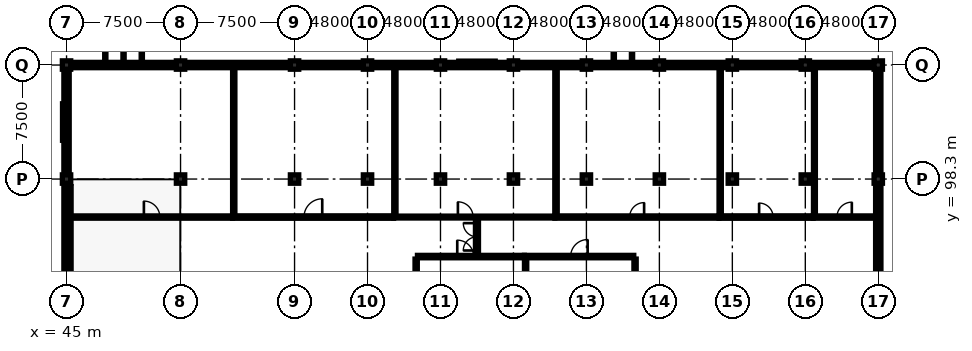
"""IFC4 building model, lengths in metres.
Left out: names, types, materials, properties, quantities, classifications, styles, units other than length and angle.
Written with IfcOpenShell. Run it as: python <this file> out.ifc"""

import sys

from ifc_helpers import new_model, si_unit, direction, frame, frame_2d, origin, origin_2d, place, context, subcontext, project, spatial, rectangle, extrude, element, fill, save


model = new_model("IFC4")
c1 = context("Model", 3, precision=1e-05, world=origin(), true_north=direction((0.0, 1.0)))
c2 = subcontext(c1, "Body", "Model", "MODEL_VIEW")
j1 = project(units=[si_unit("LENGTHUNIT", "METRE"), si_unit("PLANEANGLEUNIT", "RADIAN")], contexts=[c1])
p1 = place(None, origin())
s1 = spatial("IfcSite", under=j1, at=p1, CompositionType="ELEMENT")
p2 = place(p1, origin())
s2 = spatial("IfcBuilding", under=s1, at=p2, CompositionType="ELEMENT")
p3 = place(p2, frame((0.0, 0.0, 9.5)))
s3 = spatial("IfcBuildingStorey", under=s2, at=p3, CompositionType="ELEMENT", Elevation=9.5)
for number, where, z_axis, x_axis in (
    (1, (45.0, 98.3, 0.0), (0.0, 0.0, 1.0), (1.0, 0.0, 0.0)),
    (2, (45.0, 105.8, 0.0), (0.0, 0.0, 1.0), (1.0, 0.0, 0.0)),
):
    element("IfcColumn", number, at=place(p3, frame(where, z_axis=z_axis, x_axis=x_axis)), inside=s3, PredefinedType="COLUMN", context=c2, shape_type="SweptSolid", body=[
        extrude(rectangle(XDim=0.55, YDim=0.55, at=origin_2d()), origin(), (0.0, 0.0, 1.0), 3.75),
    ])
p4 = place(p3, frame((52.5, 98.3, 0.0), z_axis=(0.0, 0.0, 1.0), x_axis=(1.0, 0.0, 0.0)))
e3 = element("IfcColumn", 3, at=p4, inside=s3, PredefinedType="COLUMN", context=c2, shape_type="SweptSolid", body=[
    extrude(rectangle(XDim=0.55, YDim=0.55, at=origin_2d()), origin(), (0.0, 0.0, 1.0), 3.7),
])
p5 = place(p3, frame((52.5, 105.8, 0.0), z_axis=(0.0, 0.0, 1.0), x_axis=(1.0, 0.0, 0.0)))
e4 = element("IfcColumn", 4, at=p5, inside=s3, PredefinedType="COLUMN", context=c2, shape_type="SweptSolid", body=[
    extrude(rectangle(XDim=0.55, YDim=0.55, at=origin_2d()), origin(), (0.0, 0.0, 1.0), 3.75),
])
p6 = place(p3, frame((60.0, 98.3, 0.0), z_axis=(0.0, 0.0, 1.0), x_axis=(1.0, 0.0, 0.0)))
e5 = element("IfcColumn", 5, at=p6, inside=s3, PredefinedType="COLUMN", context=c2, shape_type="SweptSolid", body=[
    extrude(rectangle(XDim=0.55, YDim=0.55, at=origin_2d()), origin(), (0.0, 0.0, 1.0), 3.7),
])
p7 = place(p3, frame((60.0, 105.8, 0.0), z_axis=(0.0, 0.0, 1.0), x_axis=(1.0, 0.0, 0.0)))
e6 = element("IfcColumn", 6, at=p7, inside=s3, PredefinedType="COLUMN", context=c2, shape_type="SweptSolid", body=[
    extrude(rectangle(XDim=0.55, YDim=0.55, at=origin_2d()), origin(), (0.0, 0.0, 1.0), 3.75),
])
p8 = place(p3, frame((64.8, 98.3, 0.0), z_axis=(0.0, 0.0, 1.0), x_axis=(1.0, 0.0, 0.0)))
e7 = element("IfcColumn", 7, at=p8, inside=s3, PredefinedType="COLUMN", context=c2, shape_type="SweptSolid", body=[
    extrude(rectangle(XDim=0.55, YDim=0.55, at=origin_2d()), origin(), (0.0, 0.0, 1.0), 3.7),
])
p9 = place(p3, frame((64.8, 105.8, 0.0), z_axis=(0.0, 0.0, 1.0), x_axis=(1.0, 0.0, 0.0)))
e8 = element("IfcColumn", 8, at=p9, inside=s3, PredefinedType="COLUMN", context=c2, shape_type="SweptSolid", body=[
    extrude(rectangle(XDim=0.55, YDim=0.55, at=origin_2d()), origin(), (0.0, 0.0, 1.0), 3.75),
])
p10 = place(p3, frame((69.6, 98.3, 0.0), z_axis=(0.0, 0.0, 1.0), x_axis=(1.0, 0.0, 0.0)))
e9 = element("IfcColumn", 9, at=p10, inside=s3, PredefinedType="COLUMN", context=c2, shape_type="SweptSolid", body=[
    extrude(rectangle(XDim=0.55, YDim=0.55, at=origin_2d()), origin(), (0.0, 0.0, 1.0), 3.7),
])
p11 = place(p3, frame((69.6, 105.8, 0.0), z_axis=(0.0, 0.0, 1.0), x_axis=(1.0, 0.0, 0.0)))
e10 = element("IfcColumn", 10, at=p11, inside=s3, PredefinedType="COLUMN", context=c2, shape_type="SweptSolid", body=[
    extrude(rectangle(XDim=0.55, YDim=0.55, at=origin_2d()), origin(), (0.0, 0.0, 1.0), 3.75),
])
for number, where, z_axis, x_axis in (
    (11, (74.4, 98.3, 0.0), (0.0, 0.0, 1.0), (1.0, 0.0, 0.0)),
    (12, (74.4, 105.8, 0.0), (0.0, 0.0, 1.0), (1.0, 0.0, 0.0)),
    (13, (79.2, 98.3, 0.0), (0.0, 0.0, 1.0), (1.0, 0.0, 0.0)),
    (14, (79.2, 105.8, 0.0), (0.0, 0.0, 1.0), (1.0, 0.0, 0.0)),
    (15, (84.0, 98.3, 0.0), (0.0, 0.0, 1.0), (1.0, 0.0, 0.0)),
    (16, (84.0, 105.8, 0.0), (0.0, 0.0, 1.0), (1.0, 0.0, 0.0)),
    (17, (88.8, 98.3, 0.0), (0.0, 0.0, 1.0), (1.0, 0.0, 0.0)),
    (18, (88.8, 105.8, 0.0), (0.0, 0.0, 1.0), (1.0, 0.0, 0.0)),
    (19, (93.6, 98.3, 0.0), (0.0, 0.0, 1.0), (1.0, 0.0, 0.0)),
    (20, (93.6, 105.8, 0.0), (0.0, 0.0, 1.0), (1.0, 0.0, 0.0)),
    (21, (98.4, 98.3, 0.0), (0.0, 0.0, 1.0), (1.0, 0.0, 0.0)),
    (22, (98.4, 105.8, 0.0), (0.0, 0.0, 1.0), (1.0, 0.0, 0.0)),
):
    element("IfcColumn", number, at=place(p3, frame(where, z_axis=z_axis, x_axis=x_axis)), inside=s3, PredefinedType="COLUMN", context=c2, shape_type="SweptSolid", body=[
        extrude(rectangle(XDim=0.55, YDim=0.55, at=origin_2d()), origin(), (0.0, 0.0, 1.0), 3.7),
    ])
p12 = place(p3, frame((45.0, 91.05, 0.0), z_axis=(0.0, 0.0, 1.0), x_axis=(0.0, 1.0, 0.0)))
e23 = element("IfcWall", 23, at=p12, inside=s3, PredefinedType="SOLIDWALL", context=c2, shape_type="SweptSolid", body=[
    extrude(rectangle(XDim=6.975, YDim=0.35, at=frame_2d((3.487, 0.0))), origin(), (0.0, 0.0, 1.0), 3.035),
])
p13 = place(p3, frame((45.0, 98.575, 0.0), z_axis=(0.0, 0.0, 1.0), x_axis=(0.0, 1.0, 0.0)))
e24 = element("IfcWall", 24, at=p13, inside=s3, PredefinedType="SOLIDWALL", context=c2, shape_type="SweptSolid", body=[
    extrude(rectangle(XDim=6.95, YDim=0.35, at=frame_2d((3.475, 0.0))), origin(), (0.0, 0.0, 1.0), 3.035),
])
p14 = place(p13, frame((2.775, 0.0, 0.9)))
e25 = element("IfcOpeningElement", 25, at=p14, cuts=e24, PredefinedType="OPENING", context=c2, shape_type="SweptSolid", body=[
    extrude(rectangle(XDim=1.4, YDim=1.3, at=frame_2d((0.7, 0.65))), frame((0.0, 0.187, 0.0), z_axis=(0.0, -1.0, 0.0), x_axis=(1.0, 0.0, 0.0)), (0.0, 0.0, 1.0), 0.374),
])
p15 = place(p3, frame((45.275, 105.8, 0.0), z_axis=(0.0, 0.0, 1.0), x_axis=(1.0, 0.0, 0.0)))
e26 = element("IfcWall", 26, at=p15, inside=s3, PredefinedType="SOLIDWALL", context=c2, shape_type="SweptSolid", body=[
    extrude(rectangle(XDim=6.95, YDim=0.35, at=frame_2d((3.475, 0.0))), origin(), (0.0, 0.0, 1.0), 2.985),
])
p16 = place(p15, frame((2.775, 0.0, 0.9)))
e27 = element("IfcOpeningElement", 27, at=p16, cuts=e26, PredefinedType="OPENING", context=c2, shape_type="SweptSolid", body=[
    extrude(rectangle(XDim=1.4, YDim=1.5, at=frame_2d((0.7, 0.75))), frame((0.0, 0.187, 0.0), z_axis=(0.0, -1.0, 0.0), x_axis=(1.0, 0.0, 0.0)), (0.0, 0.0, 1.0), 0.374),
])
p17 = place(p3, frame((52.775, 105.8, 0.0), z_axis=(0.0, 0.0, 1.0), x_axis=(1.0, 0.0, 0.0)))
e28 = element("IfcWall", 28, at=p17, inside=s3, PredefinedType="SOLIDWALL", context=c2, shape_type="SweptSolid", body=[
    extrude(rectangle(XDim=6.95, YDim=0.35, at=frame_2d((3.475, 0.0))), origin(), (0.0, 0.0, 1.0), 2.985),
])
p18 = place(p3, frame((60.275, 105.8, 0.0), z_axis=(0.0, 0.0, 1.0), x_axis=(1.0, 0.0, 0.0)))
e29 = element("IfcWall", 29, at=p18, inside=s3, PredefinedType="SOLIDWALL", context=c2, shape_type="SweptSolid", body=[
    extrude(rectangle(XDim=4.25, YDim=0.35, at=frame_2d((2.125, 0.0))), origin(), (0.0, 0.0, 1.0), 2.985),
])
p19 = place(p18, frame((1.575, 0.0, 0.9)))
e30 = element("IfcOpeningElement", 30, at=p19, cuts=e29, PredefinedType="OPENING", context=c2, shape_type="SweptSolid", body=[
    extrude(rectangle(XDim=1.1, YDim=1.7, at=frame_2d((0.55, 0.85))), frame((0.0, 0.187, 0.0), z_axis=(0.0, -1.0, 0.0), x_axis=(1.0, 0.0, 0.0)), (0.0, 0.0, 1.0), 0.374),
])
for number, where, z_axis, x_axis in (
    (31, (65.075, 105.8, 0.0), (0.0, 0.0, 1.0), (1.0, 0.0, 0.0)),
    (32, (69.875, 105.8, 0.0), (0.0, 0.0, 1.0), (1.0, 0.0, 0.0)),
    (33, (74.675, 105.8, 0.0), (0.0, 0.0, 1.0), (1.0, 0.0, 0.0)),
    (34, (79.475, 105.8, 0.0), (0.0, 0.0, 1.0), (1.0, 0.0, 0.0)),
    (35, (84.275, 105.8, 0.0), (0.0, 0.0, 1.0), (1.0, 0.0, 0.0)),
    (36, (89.075, 105.8, 0.0), (0.0, 0.0, 1.0), (1.0, 0.0, 0.0)),
    (37, (93.875, 105.8, 0.0), (0.0, 0.0, 1.0), (1.0, 0.0, 0.0)),
):
    element("IfcWall", number, at=place(p3, frame(where, z_axis=z_axis, x_axis=x_axis)), inside=s3, PredefinedType="SOLIDWALL", context=c2, shape_type="SweptSolid", body=[
        extrude(rectangle(XDim=4.25, YDim=0.35, at=frame_2d((2.125, 0.0))), origin(), (0.0, 0.0, 1.0), 2.985),
    ])
for number, where, z_axis, x_axis in (
    (38, (98.4, 105.525, 0.0), (0.0, 0.0, 1.0), (0.0, -1.0, 0.0)),
    (39, (98.4, 98.025, 0.0), (0.0, 0.0, 1.0), (0.0, -1.0, 0.0)),
):
    element("IfcWall", number, at=place(p3, frame(where, z_axis=z_axis, x_axis=x_axis)), inside=s3, PredefinedType="SOLIDWALL", context=c2, shape_type="SweptSolid", body=[
        extrude(rectangle(XDim=6.95, YDim=0.35, at=frame_2d((3.475, 0.0))), origin(), (0.0, 0.0, 1.0), 3.035),
    ])
p20 = place(p3, frame((45.18, 83.78, 3.9), z_axis=(0.0, 0.0, 1.0), x_axis=(0.0, 1.0, 0.0)))
e40 = element("IfcWall", 40, at=p20, inside=s3, PredefinedType="PARAPET", context=c2, shape_type="SweptSolid", body=[
    extrude(rectangle(XDim=14.02, YDim=0.24, at=frame_2d((7.01, 0.0))), origin(), (0.0, 0.0, 1.0), 0.6),
])
p21 = place(p3, frame((72.0, 93.285, 0.0), z_axis=(0.0, 0.0, 1.0), x_axis=(0.0, 1.0, 0.0)))
e41 = element("IfcWall", 41, at=p21, inside=s3, PredefinedType="PARTITIONING", context=c2, shape_type="SweptSolid", body=[
    extrude(rectangle(XDim=2.43, YDim=0.2, at=frame_2d((1.215, 0.0))), origin(), (0.0, 0.0, 1.0), 3.7),
])
p22 = place(p21, frame((0.315, 0.0, 0.0)))
e42 = element("IfcOpeningElement", 42, at=p22, cuts=e41, PredefinedType="OPENING", context=c2, shape_type="SweptSolid", body=[
    extrude(rectangle(XDim=1.8, YDim=2.15, at=frame_2d((0.9, 1.075))), frame((0.0, 0.112, 0.0), z_axis=(0.0, -1.0, 0.0), x_axis=(1.0, 0.0, 0.0)), (0.0, 0.0, 1.0), 0.224),
])
p23 = place(p3, frame((45.312, 95.8, 0.0), z_axis=(0.0, 0.0, 1.0), x_axis=(1.0, 0.0, 0.0)))
e43 = element("IfcWall", 43, at=p23, inside=s3, PredefinedType="PARTITIONING", context=c2, shape_type="SweptSolid", body=[
    extrude(rectangle(XDim=10.603, YDim=0.15, at=frame_2d((5.302, 0.0))), origin(), (0.0, 0.0, 1.0), 3.035),
])
p24 = place(p23, frame((4.777, 0.0, 0.0)))
e44 = element("IfcOpeningElement", 44, at=p24, cuts=e43, PredefinedType="OPENING", context=c2, shape_type="SweptSolid", body=[
    extrude(rectangle(XDim=1.05, YDim=2.15, at=frame_2d((0.525, 1.075))), frame((0.0, 0.087, 0.0), z_axis=(0.0, -1.0, 0.0), x_axis=(1.0, 0.0, 0.0)), (0.0, 0.0, 1.0), 0.174),
])
p25 = place(p3, frame((55.927, 95.8, 0.0), z_axis=(0.0, 0.0, 1.0), x_axis=(1.0, 0.0, 0.0)))
e45 = element("IfcWall", 45, at=p25, inside=s3, PredefinedType="PARTITIONING", context=c2, shape_type="SweptSolid", body=[
    extrude(rectangle(XDim=10.588, YDim=0.16, at=frame_2d((5.294, 0.0))), origin(), (0.0, 0.0, 1.0), 2.985),
])
p26 = place(p25, frame((4.694, 0.0, 0.0)))
e46 = element("IfcOpeningElement", 46, at=p26, cuts=e45, PredefinedType="OPENING", context=c2, shape_type="SweptSolid", body=[
    extrude(rectangle(XDim=1.2, YDim=2.15, at=frame_2d((0.6, 1.075))), frame((0.0, 0.092, 0.0), z_axis=(0.0, -1.0, 0.0), x_axis=(1.0, 0.0, 0.0)), (0.0, 0.0, 1.0), 0.184),
])
p27 = place(p3, frame((66.527, 95.8, 0.0), z_axis=(0.0, 0.0, 1.0), x_axis=(1.0, 0.0, 0.0)))
e47 = element("IfcWall", 47, at=p27, inside=s3, PredefinedType="PARTITIONING", context=c2, shape_type="SweptSolid", body=[
    extrude(rectangle(XDim=10.588, YDim=0.125, at=frame_2d((5.294, 0.0))), origin(), (0.0, 0.0, 1.0), 2.985),
])
p28 = place(p27, frame((4.219, 0.0, 0.0)))
e48 = element("IfcOpeningElement", 48, at=p28, cuts=e47, PredefinedType="OPENING", context=c2, shape_type="SweptSolid", body=[
    extrude(rectangle(XDim=1.0, YDim=2.22, at=frame_2d((0.5, 1.11))), frame((0.0, 0.074, 0.0), z_axis=(0.0, -1.0, 0.0), x_axis=(1.0, 0.0, 0.0)), (0.0, 0.0, 1.0), 0.149),
])
p29 = place(p3, frame((77.127, 95.8, 0.0), z_axis=(0.0, 0.0, 1.0), x_axis=(1.0, 0.0, 0.0)))
e49 = element("IfcWall", 49, at=p29, inside=s3, PredefinedType="PARTITIONING", context=c2, shape_type="SweptSolid", body=[
    extrude(rectangle(XDim=10.788, YDim=0.15, at=frame_2d((5.394, 0.0))), origin(), (0.0, 0.0, 1.0), 2.985),
])
p30 = place(p29, frame((4.919, 0.0, 0.0)))
e50 = element("IfcOpeningElement", 50, at=p30, cuts=e49, PredefinedType="OPENING", context=c2, shape_type="SweptSolid", body=[
    extrude(rectangle(XDim=0.95, YDim=2.15, at=frame_2d((0.475, 1.075))), frame((0.0, 0.087, 0.0), z_axis=(0.0, -1.0, 0.0), x_axis=(1.0, 0.0, 0.0)), (0.0, 0.0, 1.0), 0.174),
])
p31 = place(p3, frame((87.927, 95.8, 0.0), z_axis=(0.0, 0.0, 1.0), x_axis=(1.0, 0.0, 0.0)))
e51 = element("IfcWall", 51, at=p31, inside=s3, PredefinedType="PARTITIONING", context=c2, shape_type="SweptSolid", body=[
    extrude(rectangle(XDim=6.188, YDim=0.16, at=frame_2d((3.094, 0.0))), origin(), (0.0, 0.0, 1.0), 2.985),
])
p32 = place(p31, frame((2.634, 0.0, 0.0)))
e52 = element("IfcOpeningElement", 52, at=p32, cuts=e51, PredefinedType="OPENING", context=c2, shape_type="SweptSolid", body=[
    extrude(rectangle(XDim=0.92, YDim=2.1, at=frame_2d((0.46, 1.05))), frame((0.0, 0.092, 0.0), z_axis=(0.0, -1.0, 0.0), x_axis=(1.0, 0.0, 0.0)), (0.0, 0.0, 1.0), 0.184),
])
p33 = place(p3, frame((94.127, 95.8, 0.0), z_axis=(0.0, 0.0, 1.0), x_axis=(1.0, 0.0, 0.0)))
e53 = element("IfcWall", 53, at=p33, inside=s3, PredefinedType="PARTITIONING", context=c2, shape_type="SweptSolid", body=[
    extrude(rectangle(XDim=4.086, YDim=0.15, at=frame_2d((2.043, 0.0))), origin(), (0.0, 0.0, 1.0), 3.035),
])
p34 = place(p33, frame((1.553, 0.0, 0.0)))
e54 = element("IfcOpeningElement", 54, at=p34, cuts=e53, PredefinedType="OPENING", context=c2, shape_type="SweptSolid", body=[
    extrude(rectangle(XDim=0.98, YDim=2.12, at=frame_2d((0.49, 1.06))), frame((0.0, 0.087, 0.0), z_axis=(0.0, -1.0, 0.0), x_axis=(1.0, 0.0, 0.0)), (0.0, 0.0, 1.0), 0.174),
])
p35 = place(p3, frame((68.085, 93.2, 0.0), z_axis=(0.0, 0.0, 1.0), x_axis=(1.0, 0.0, 0.0)))
e55 = element("IfcWall", 55, at=p35, inside=s3, PredefinedType="PARTITIONING", context=c2, shape_type="SweptSolid", body=[
    extrude(rectangle(XDim=7.03, YDim=0.16, at=frame_2d((3.515, 0.0))), origin(), (0.0, 0.0, 1.0), 2.985),
])
p36 = place(p35, frame((2.618, 0.0, 0.0)))
e56 = element("IfcOpeningElement", 56, at=p36, cuts=e55, PredefinedType="OPENING", context=c2, shape_type="SweptSolid", body=[
    extrude(rectangle(XDim=1.08, YDim=2.18, at=frame_2d((0.54, 1.09))), frame((0.0, 0.092, 0.0), z_axis=(0.0, -1.0, 0.0), x_axis=(1.0, 0.0, 0.0)), (0.0, 0.0, 1.0), 0.184),
])
p37 = place(p3, frame((75.127, 93.2, 0.0), z_axis=(0.0, 0.0, 1.0), x_axis=(1.0, 0.0, 0.0)))
e57 = element("IfcWall", 57, at=p37, inside=s3, PredefinedType="PARTITIONING", context=c2, shape_type="SweptSolid", body=[
    extrude(rectangle(XDim=7.188, YDim=0.16, at=frame_2d((3.594, 0.0))), origin(), (0.0, 0.0, 1.0), 2.985),
])
p38 = place(p37, frame((3.034, 0.0, 0.0)))
e58 = element("IfcOpeningElement", 58, at=p38, cuts=e57, PredefinedType="OPENING", context=c2, shape_type="SweptSolid", body=[
    extrude(rectangle(XDim=1.12, YDim=2.2, at=frame_2d((0.56, 1.1))), frame((0.0, 0.092, 0.0), z_axis=(0.0, -1.0, 0.0), x_axis=(1.0, 0.0, 0.0)), (0.0, 0.0, 1.0), 0.184),
])
p39 = place(p3, frame((56.0, 95.892, 0.0), z_axis=(0.0, 0.0, 1.0), x_axis=(0.0, 1.0, 0.0)))
e59 = element("IfcWall", 59, at=p39, inside=s3, PredefinedType="PARTITIONING", context=c2, shape_type="SweptSolid", body=[
    extrude(rectangle(XDim=9.721, YDim=0.15, at=frame_2d((4.86, 0.0))), origin(), (0.0, 0.0, 1.0), 2.985),
])
p40 = place(p3, frame((66.6, 95.875, 0.0), z_axis=(0.0, 0.0, 1.0), x_axis=(0.0, 1.0, 0.0)))
e60 = element("IfcWall", 60, at=p40, inside=s3, PredefinedType="PARTITIONING", context=c2, shape_type="SweptSolid", body=[
    extrude(rectangle(XDim=9.739, YDim=0.15, at=frame_2d((4.869, 0.0))), origin(), (0.0, 0.0, 1.0), 3.085),
])
p41 = place(p3, frame((77.2, 95.887, 0.0), z_axis=(0.0, 0.0, 1.0), x_axis=(0.0, 1.0, 0.0)))
e61 = element("IfcWall", 61, at=p41, inside=s3, PredefinedType="PARTITIONING", context=c2, shape_type="SweptSolid", body=[
    extrude(rectangle(XDim=9.726, YDim=0.16, at=frame_2d((4.863, 0.0))), origin(), (0.0, 0.0, 1.0), 3.035),
])
p42 = place(p3, frame((88.0, 95.892, 0.0), z_axis=(0.0, 0.0, 1.0), x_axis=(0.0, 1.0, 0.0)))
e62 = element("IfcWall", 62, at=p42, inside=s3, PredefinedType="PARTITIONING", context=c2, shape_type="SweptSolid", body=[
    extrude(rectangle(XDim=9.721, YDim=0.15, at=frame_2d((4.86, 0.0))), origin(), (0.0, 0.0, 1.0), 3.035),
])
p43 = place(p3, frame((94.2, 95.887, 0.0), z_axis=(0.0, 0.0, 1.0), x_axis=(0.0, 1.0, 0.0)))
e63 = element("IfcWall", 63, at=p43, inside=s3, PredefinedType="PARTITIONING", context=c2, shape_type="SweptSolid", body=[
    extrude(rectangle(XDim=9.726, YDim=0.125, at=frame_2d((4.863, 0.0))), origin(), (0.0, 0.0, 1.0), 3.035),
])
p44 = place(p3, frame((68.0, 83.487, 0.0), z_axis=(0.0, 0.0, 1.0), x_axis=(0.0, 1.0, 0.0)))
e64 = element("IfcWall", 64, at=p44, inside=s3, PredefinedType="PARTITIONING", context=c2, shape_type="SweptSolid", body=[
    extrude(rectangle(XDim=9.548, YDim=0.15, at=frame_2d((4.774, 0.0))), origin(), (0.0, 0.0, 1.0), 3.035),
])
p45 = place(p3, frame((75.2, 83.487, 0.0), z_axis=(0.0, 0.0, 1.0), x_axis=(0.0, 1.0, 0.0)))
e65 = element("IfcWall", 65, at=p45, inside=s3, PredefinedType="PARTITIONING", context=c2, shape_type="SweptSolid", body=[
    extrude(rectangle(XDim=9.621, YDim=0.15, at=frame_2d((4.811, 0.0))), origin(), (0.0, 0.0, 1.0), 3.035),
])
p46 = place(p3, frame((82.4, 83.487, 0.0), z_axis=(0.0, 0.0, 1.0), x_axis=(0.0, 1.0, 0.0)))
e66 = element("IfcWall", 66, at=p46, inside=s3, PredefinedType="PARTITIONING", context=c2, shape_type="SweptSolid", body=[
    extrude(rectangle(XDim=9.548, YDim=0.15, at=frame_2d((4.774, 0.0))), origin(), (0.0, 0.0, 1.0), 3.035),
])
p47 = place(p14, origin())
e67 = element("IfcWindow", 67, at=p47, inside=s3, PartitioningType="SINGLE_PANEL", PredefinedType="WINDOW", context=c2, shape_type="SweptSolid", body=[
    extrude(rectangle(XDim=1.4, YDim=1.3, at=frame_2d((0.7, 0.65))), frame((0.0, 0.03, 0.0), z_axis=(0.0, -1.0, 0.0), x_axis=(1.0, 0.0, 0.0)), (0.0, 0.0, 1.0), 0.06),
])
fill(e25, e67)
p48 = place(p16, origin())
e68 = element("IfcWindow", 68, at=p48, inside=s3, PartitioningType="SINGLE_PANEL", PredefinedType="WINDOW", context=c2, shape_type="SweptSolid", body=[
    extrude(rectangle(XDim=1.4, YDim=1.5, at=frame_2d((0.7, 0.75))), frame((0.0, 0.03, 0.0), z_axis=(0.0, -1.0, 0.0), x_axis=(1.0, 0.0, 0.0)), (0.0, 0.0, 1.0), 0.06),
])
fill(e27, e68)
p49 = place(p19, origin())
e69 = element("IfcWindow", 69, at=p49, inside=s3, PartitioningType="SINGLE_PANEL", PredefinedType="WINDOW", context=c2, shape_type="SweptSolid", body=[
    extrude(rectangle(XDim=1.1, YDim=1.7, at=frame_2d((0.55, 0.85))), frame((0.0, 0.03, 0.0), z_axis=(0.0, -1.0, 0.0), x_axis=(1.0, 0.0, 0.0)), (0.0, 0.0, 1.0), 0.06),
])
fill(e30, e69)
p50 = place(p22, origin())
e70 = element("IfcDoor", 70, at=p50, inside=s3, OperationType="DOUBLE_DOOR_SINGLE_SWING", PredefinedType="DOOR", context=c2, shape_type="SweptSolid", body=[
    extrude(rectangle(XDim=1.8, YDim=2.15, at=frame_2d((0.9, 1.075))), frame((0.0, 0.025, 0.0), z_axis=(0.0, -1.0, 0.0), x_axis=(1.0, 0.0, 0.0)), (0.0, 0.0, 1.0), 0.05),
])
fill(e42, e70)
p51 = place(p24, origin())
e71 = element("IfcDoor", 71, at=p51, inside=s3, OperationType="SINGLE_SWING_LEFT", PredefinedType="DOOR", context=c2, shape_type="SweptSolid", body=[
    extrude(rectangle(XDim=1.05, YDim=2.15, at=frame_2d((0.525, 1.075))), frame((0.0, 0.025, 0.0), z_axis=(0.0, -1.0, 0.0), x_axis=(1.0, 0.0, 0.0)), (0.0, 0.0, 1.0), 0.05),
])
fill(e44, e71)
p52 = place(p26, origin())
e72 = element("IfcDoor", 72, at=p52, inside=s3, OperationType="SINGLE_SWING_RIGHT", PredefinedType="DOOR", context=c2, shape_type="SweptSolid", body=[
    extrude(rectangle(XDim=1.2, YDim=2.15, at=frame_2d((0.6, 1.075))), frame((0.0, 0.025, 0.0), z_axis=(0.0, -1.0, 0.0), x_axis=(1.0, 0.0, 0.0)), (0.0, 0.0, 1.0), 0.05),
])
fill(e46, e72)
p53 = place(p28, origin())
e73 = element("IfcDoor", 73, at=p53, inside=s3, OperationType="SINGLE_SWING_LEFT", PredefinedType="DOOR", context=c2, shape_type="SweptSolid", body=[
    extrude(rectangle(XDim=1.0, YDim=2.22, at=frame_2d((0.5, 1.11))), frame((0.0, 0.025, 0.0), z_axis=(0.0, -1.0, 0.0), x_axis=(1.0, 0.0, 0.0)), (0.0, 0.0, 1.0), 0.05),
])
fill(e48, e73)
p54 = place(p30, origin())
e74 = element("IfcDoor", 74, at=p54, inside=s3, OperationType="SINGLE_SWING_RIGHT", PredefinedType="DOOR", context=c2, shape_type="SweptSolid", body=[
    extrude(rectangle(XDim=0.95, YDim=2.15, at=frame_2d((0.475, 1.075))), frame((0.0, 0.025, 0.0), z_axis=(0.0, -1.0, 0.0), x_axis=(1.0, 0.0, 0.0)), (0.0, 0.0, 1.0), 0.05),
])
fill(e50, e74)
p55 = place(p32, origin())
e75 = element("IfcDoor", 75, at=p55, inside=s3, OperationType="SINGLE_SWING_LEFT", PredefinedType="DOOR", context=c2, shape_type="SweptSolid", body=[
    extrude(rectangle(XDim=0.92, YDim=2.1, at=frame_2d((0.46, 1.05))), frame((0.0, 0.025, 0.0), z_axis=(0.0, -1.0, 0.0), x_axis=(1.0, 0.0, 0.0)), (0.0, 0.0, 1.0), 0.05),
])
fill(e52, e75)
p56 = place(p34, origin())
e76 = element("IfcDoor", 76, at=p56, inside=s3, OperationType="SINGLE_SWING_RIGHT", PredefinedType="DOOR", context=c2, shape_type="SweptSolid", body=[
    extrude(rectangle(XDim=0.98, YDim=2.12, at=frame_2d((0.49, 1.06))), frame((0.0, 0.025, 0.0), z_axis=(0.0, -1.0, 0.0), x_axis=(1.0, 0.0, 0.0)), (0.0, 0.0, 1.0), 0.05),
])
fill(e54, e76)
p57 = place(p36, origin())
e77 = element("IfcDoor", 77, at=p57, inside=s3, OperationType="SINGLE_SWING_LEFT", PredefinedType="DOOR", context=c2, shape_type="SweptSolid", body=[
    extrude(rectangle(XDim=1.08, YDim=2.18, at=frame_2d((0.54, 1.09))), frame((0.0, 0.025, 0.0), z_axis=(0.0, -1.0, 0.0), x_axis=(1.0, 0.0, 0.0)), (0.0, 0.0, 1.0), 0.05),
])
fill(e56, e77)
p58 = place(p38, origin())
e78 = element("IfcDoor", 78, at=p58, inside=s3, OperationType="SINGLE_SWING_RIGHT", PredefinedType="DOOR", context=c2, shape_type="SweptSolid", body=[
    extrude(rectangle(XDim=1.12, YDim=2.2, at=frame_2d((0.56, 1.1))), frame((0.0, 0.025, 0.0), z_axis=(0.0, -1.0, 0.0), x_axis=(1.0, 0.0, 0.0)), (0.0, 0.0, 1.0), 0.05),
])
fill(e58, e78)
save(model, sys.argv[1])
